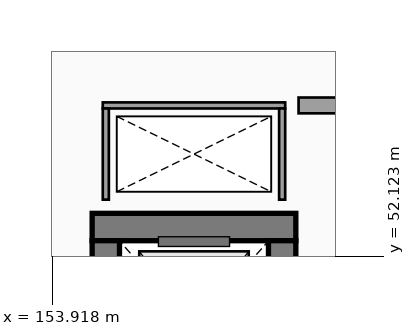
"""IFC4 building model, lengths in metres.
Left out: names, types, materials, properties, quantities, classifications, styles, units other than length and angle.
Written with IfcOpenShell. Run it as: python <this file> out.ifc"""

import sys

from ifc_helpers import new_model, si_unit, direction, frame, frame_2d, origin, place, context, subcontext, project, spatial, rectangle, extrude, element, save


model = new_model("IFC4")
c1 = context("Model", 3, precision=1e-05, world=origin(), true_north=direction((0.0, 1.0)))
c2 = subcontext(c1, "Body", "Model", "MODEL_VIEW")
j1 = project(units=[si_unit("LENGTHUNIT", "METRE"), si_unit("PLANEANGLEUNIT", "RADIAN")], contexts=[c1])
p1 = place(None, origin())
s1 = spatial("IfcSite", under=j1, at=p1, CompositionType="ELEMENT")
p2 = place(p1, origin())
s2 = spatial("IfcBuilding", under=s1, at=p2, CompositionType="ELEMENT")
p3 = place(p2, frame((0.0, 0.0, 18.6)))
s3 = spatial("IfcBuildingStorey", under=s2, at=p3, CompositionType="ELEMENT", Elevation=18.6)
p4 = place(p3, frame((157.925, 52.6, 0.0), z_axis=(0.0, 0.0, 1.0), x_axis=(-1.0, 0.0, 0.0)))
e1 = element("IfcWall", 1, at=p4, inside=s3, PredefinedType="SHEAR", context=c2, shape_type="SweptSolid", body=[
    extrude(rectangle(XDim=3.35, YDim=0.45, at=frame_2d((1.675, 0.0))), origin(), (0.0, 0.0, 1.0), 4.24),
])
p5 = place(p3, frame((154.8, 52.375, 0.0), z_axis=(0.0, 0.0, 1.0), x_axis=(0.0, -1.0, 0.0)))
e2 = element("IfcWall", 2, at=p5, inside=s3, PredefinedType="SHEAR", context=c2, shape_type="SweptSolid", body=[
    extrude(rectangle(XDim=2.75, YDim=0.45, at=frame_2d((1.375, 0.0))), origin(), (0.0, 0.0, 1.0), 4.24),
])
p6 = place(p3, frame((157.7, 49.625, 0.0), z_axis=(0.0, 0.0, 1.0), x_axis=(0.0, 1.0, 0.0)))
e3 = element("IfcWall", 3, at=p6, inside=s3, PredefinedType="SHEAR", context=c2, shape_type="SweptSolid", body=[
    extrude(rectangle(XDim=2.75, YDim=0.45, at=frame_2d((1.375, 0.0))), origin(), (0.0, 0.0, 1.0), 4.24),
])
p7 = place(p6, frame((0.725, 0.0, 0.0), z_axis=(0.0, 0.0, 1.0), x_axis=(1.0, 0.0, 0.0)))
e4 = element("IfcOpeningElement", 4, at=p7, cuts=e3, PredefinedType="OPENING", context=c2, shape_type="SweptSolid", body=[
    extrude(rectangle(XDim=1.3, YDim=2.25, at=frame_2d((0.65, 1.125))), frame((0.0, 0.235, 0.0), z_axis=(0.0, -1.0, 0.0), x_axis=(1.0, 0.0, 0.0)), (0.0, 0.0, 1.0), 0.47),
])
p8 = place(p3, frame((157.75, 54.6, 0.0), z_axis=(0.0, 0.0, 1.0), x_axis=(-1.0, 0.0, 0.0)))
e5 = element("IfcWall", 5, at=p8, inside=s3, PredefinedType="PARTITIONING", context=c2, shape_type="SweptSolid", body=[
    extrude(rectangle(XDim=3.0, YDim=0.1, at=frame_2d((1.5, 0.0))), origin(), (0.0, 0.0, 1.0), 4.24),
])
for number, where, z_axis, x_axis in (
    (6, (154.8, 54.55, 0.0), (0.0, 0.0, 1.0), (0.0, -1.0, 0.0)),
    (7, (157.7, 53.05, 0.0), (0.0, 0.0, 1.0), (0.0, 1.0, 0.0)),
):
    element("IfcWall", number, at=place(p3, frame(where, z_axis=z_axis, x_axis=x_axis)), inside=s3, PredefinedType="PARTITIONING", context=c2, shape_type="SweptSolid", body=[
        extrude(rectangle(XDim=1.5, YDim=0.1, at=frame_2d((0.75, 0.0))), origin(), (0.0, 0.0, 1.0), 4.24),
    ])
p9 = place(p3, frame((161.73, 54.6, 0.0), z_axis=(0.0, 0.0, 1.0), x_axis=(-1.0, 0.0, 0.0)))
e8 = element("IfcWall", 8, at=p9, inside=s3, PredefinedType="SOLIDWALL", context=c2, shape_type="SweptSolid", body=[
    extrude(rectangle(XDim=3.76, YDim=0.26, at=frame_2d((1.88, 0.0))), origin(), (0.0, 0.0, 1.0), 4.24),
])
p10 = place(p9, frame((2.805, 0.0, 0.0), z_axis=(0.0, 0.0, 1.0), x_axis=(-1.0, 0.0, 0.0)))
e9 = element("IfcOpeningElement", 9, at=p10, cuts=e8, PredefinedType="OPENING", context=c2, shape_type="SweptSolid", body=[
    extrude(rectangle(XDim=1.85, YDim=2.25, at=frame_2d((0.925, 1.125))), frame((0.0, 0.14, 0.0), z_axis=(0.0, -1.0, 0.0), x_axis=(1.0, 0.0, 0.0)), (0.0, 0.0, 1.0), 0.28),
])
save(model, sys.argv[1])
